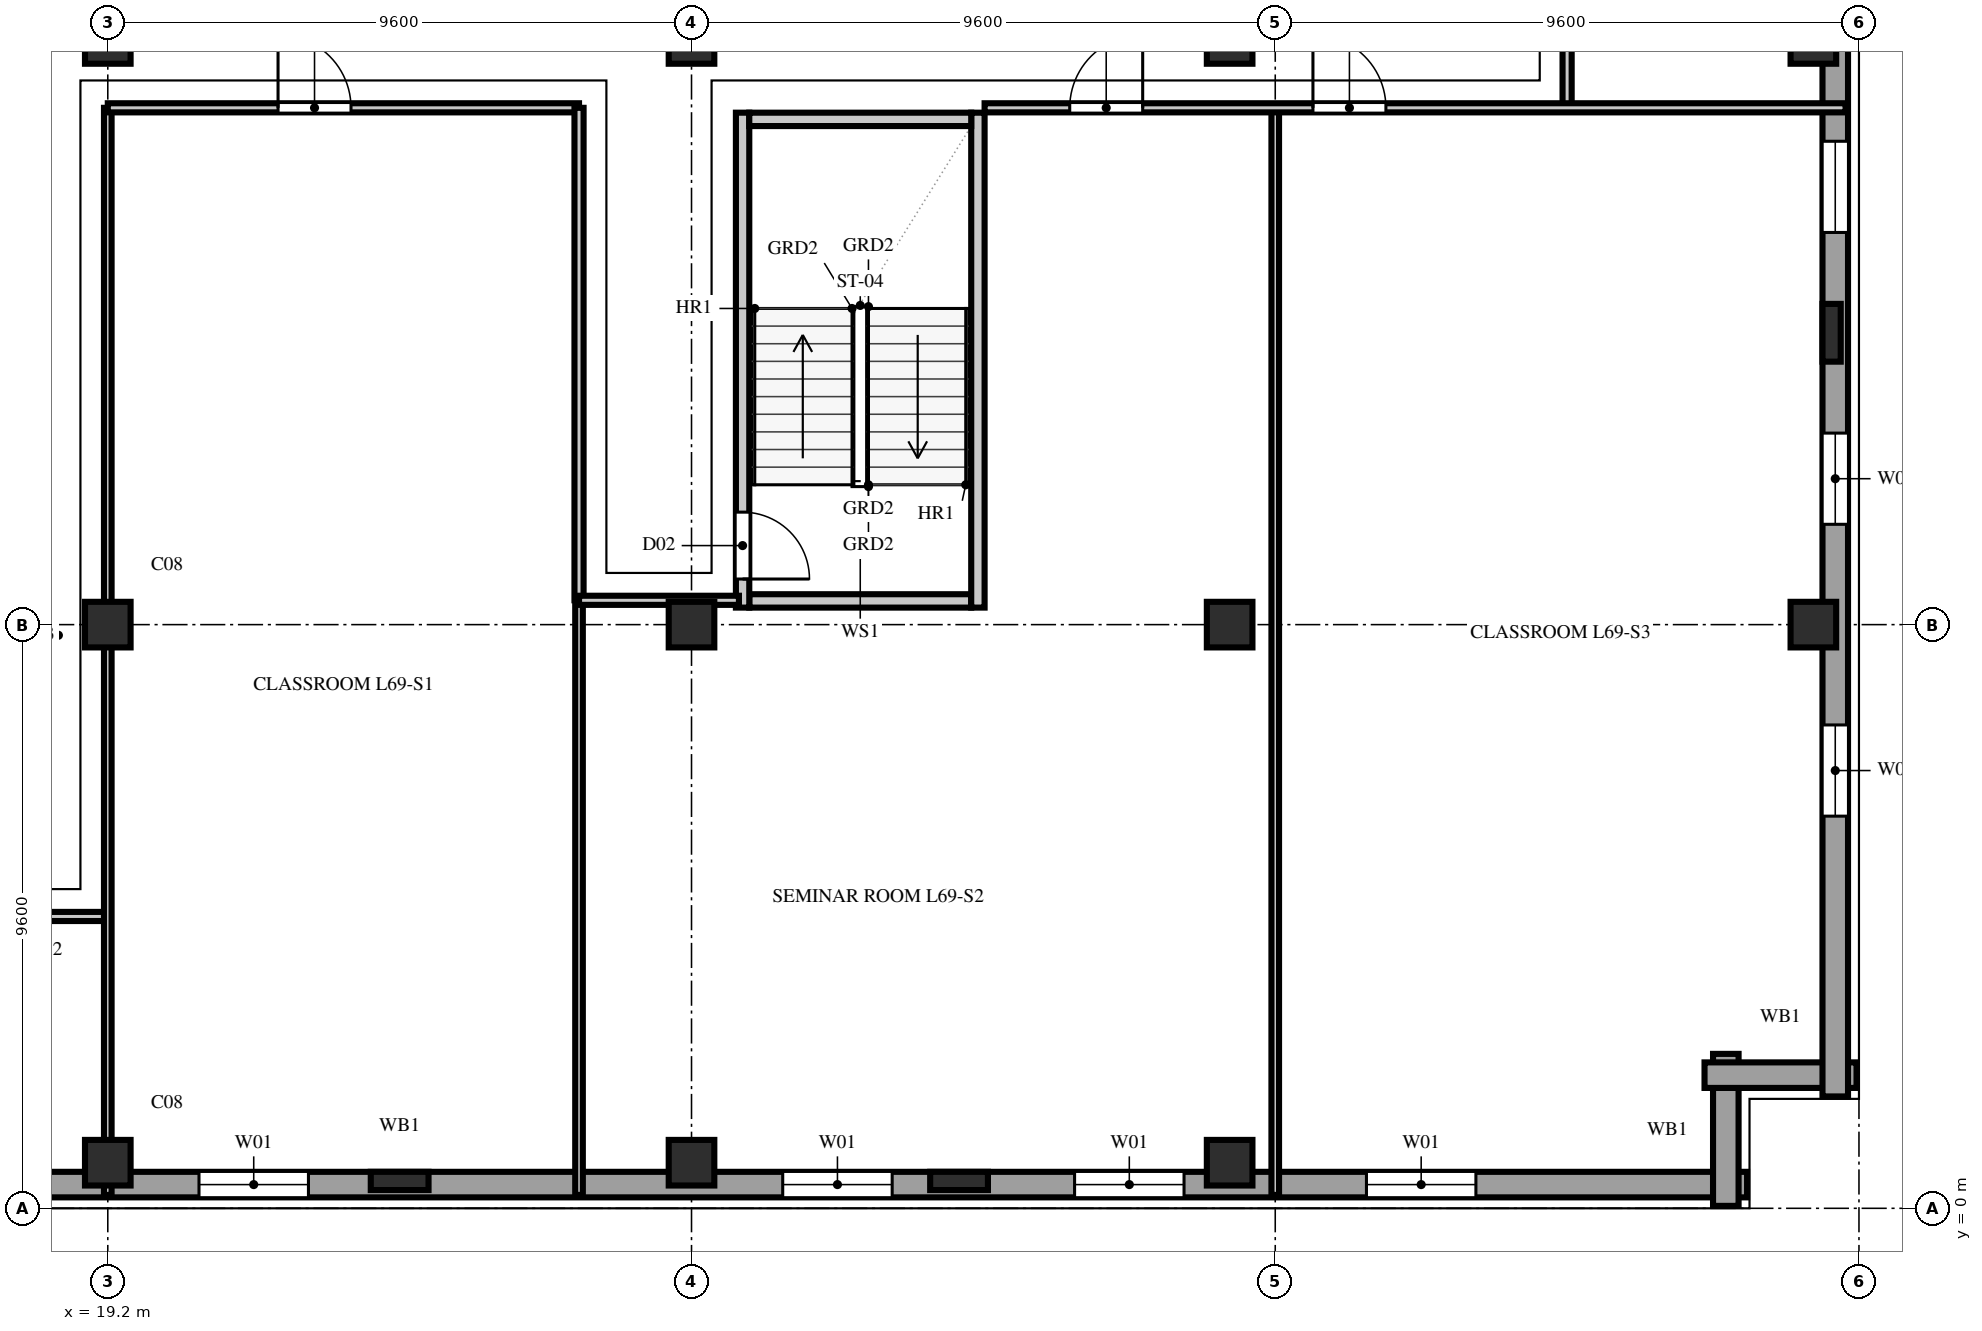
"""IFC4 building model, lengths in metres.
Left out: names, types, materials, properties, quantities, classifications, styles, units other than length and angle.
Written with IfcOpenShell. Run it as: python <this file> out.ifc"""

import sys

from ifc_helpers import new_model, si_unit, direction, frame, frame_2d, origin, origin_2d, place, context, subcontext, project, spatial, rectangle, extrude, element, fill, save


model = new_model("IFC4")
c1 = context("Model", 3, precision=1e-05, world=origin(), true_north=direction((0.0, 1.0)))
c2 = subcontext(c1, "Body", "Model", "MODEL_VIEW")
j1 = project(units=[si_unit("LENGTHUNIT", "METRE"), si_unit("PLANEANGLEUNIT", "RADIAN")], contexts=[c1])
p1 = place(None, origin())
s1 = spatial("IfcSite", under=j1, at=p1, CompositionType="ELEMENT")
p2 = place(p1, origin())
s2 = spatial("IfcBuilding", under=s1, at=p2, CompositionType="ELEMENT")
p3 = place(p2, frame((0.0, 0.0, 273.4)))
s3 = spatial("IfcBuildingStorey", under=s2, at=p3, CompositionType="ELEMENT", Elevation=273.4)
for number, where, z_axis, x_axis in (
    (1, (19.2, 0.75, 0.0), (0.0, 0.0, 1.0), (1.0, 0.0, 0.0)),
    (2, (19.2, 9.6, 0.0), (0.0, 0.0, 1.0), (1.0, 0.0, 0.0)),
    (3, (19.2, 19.2, 0.0), (0.0, 0.0, 1.0), (1.0, 0.0, 0.0)),
    (4, (28.8, 0.75, 0.0), (0.0, 0.0, 1.0), (1.0, 0.0, 0.0)),
    (5, (28.8, 9.6, 0.0), (0.0, 0.0, 1.0), (1.0, 0.0, 0.0)),
    (6, (28.8, 19.2, 0.0), (0.0, 0.0, 1.0), (1.0, 0.0, 0.0)),
    (7, (37.65, 0.75, 0.0), (0.0, 0.0, 1.0), (1.0, 0.0, 0.0)),
    (8, (37.65, 9.6, 0.0), (0.0, 0.0, 1.0), (1.0, 0.0, 0.0)),
    (9, (37.65, 19.2, 0.0), (0.0, 0.0, 1.0), (1.0, 0.0, 0.0)),
    (10, (47.25, 9.6, 0.0), (0.0, 0.0, 1.0), (1.0, 0.0, 0.0)),
    (11, (47.25, 19.2, 0.0), (0.0, 0.0, 1.0), (1.0, 0.0, 0.0)),
):
    element("IfcColumn", number, at=place(p3, frame(where, z_axis=z_axis, x_axis=x_axis)), inside=s3, PredefinedType="COLUMN", context=c2, shape_type="SweptSolid", body=[
        extrude(rectangle(XDim=0.75, YDim=0.75, at=origin_2d()), origin(), (0.0, 0.0, 1.0), 3.8),
    ])
for number, where, z_axis, x_axis in (
    (12, (24.0, 0.45, 0.0), (0.0, 0.0, 1.0), (1.0, 0.0, 0.0)),
    (13, (33.2, 0.45, 0.0), (0.0, 0.0, 1.0), (1.0, 0.0, 0.0)),
    (14, (47.55, 14.4, 0.0), (0.0, 0.0, 1.0), (0.0, 1.0, 0.0)),
):
    element("IfcColumn", number, at=place(p3, frame(where, z_axis=z_axis, x_axis=x_axis)), inside=s3, PredefinedType="PILASTER", context=c2, shape_type="SweptSolid", body=[
        extrude(rectangle(XDim=0.95, YDim=0.3, at=origin_2d()), origin(), (0.0, 0.0, 1.0), 3.8),
    ])
p4 = place(p3, frame((1.84, 0.39, 0.0), z_axis=(0.0, 0.0, 1.0), x_axis=(1.0, 0.0, 0.0)))
e15 = element("IfcWall", 15, at=p4, inside=s3, PredefinedType="SOLIDWALL", context=c2, shape_type="SweptSolid", body=[
    extrude(rectangle(XDim=44.32, YDim=0.42, at=frame_2d((22.16, 0.0))), origin(), (0.0, 0.0, 1.0), 3.54),
])
p5 = place(p4, frame((4.46, 0.0, 0.85)))
e16 = element("IfcOpeningElement", 16, at=p5, cuts=e15, PredefinedType="OPENING", context=c2, shape_type="SweptSolid", body=[
    extrude(rectangle(XDim=1.8, YDim=1.85, at=frame_2d((0.9, 0.925))), frame((0.0, 0.222, 0.0), z_axis=(0.0, -1.0, 0.0), x_axis=(1.0, 0.0, 0.0)), (0.0, 0.0, 1.0), 0.444),
])
p6 = place(p4, frame((9.26, 0.0, 0.85)))
e17 = element("IfcOpeningElement", 17, at=p6, cuts=e15, PredefinedType="OPENING", context=c2, shape_type="SweptSolid", body=[
    extrude(rectangle(XDim=1.8, YDim=1.85, at=frame_2d((0.9, 0.925))), frame((0.0, 0.222, 0.0), z_axis=(0.0, -1.0, 0.0), x_axis=(1.0, 0.0, 0.0)), (0.0, 0.0, 1.0), 0.444),
])
p7 = place(p4, frame((18.86, 0.0, 0.85)))
e18 = element("IfcOpeningElement", 18, at=p7, cuts=e15, PredefinedType="OPENING", context=c2, shape_type="SweptSolid", body=[
    extrude(rectangle(XDim=1.8, YDim=1.85, at=frame_2d((0.9, 0.925))), frame((0.0, 0.222, 0.0), z_axis=(0.0, -1.0, 0.0), x_axis=(1.0, 0.0, 0.0)), (0.0, 0.0, 1.0), 0.444),
])
p8 = place(p4, frame((28.46, 0.0, 0.85)))
e19 = element("IfcOpeningElement", 19, at=p8, cuts=e15, PredefinedType="OPENING", context=c2, shape_type="SweptSolid", body=[
    extrude(rectangle(XDim=1.8, YDim=1.85, at=frame_2d((0.9, 0.925))), frame((0.0, 0.222, 0.0), z_axis=(0.0, -1.0, 0.0), x_axis=(1.0, 0.0, 0.0)), (0.0, 0.0, 1.0), 0.444),
])
p9 = place(p4, frame((33.26, 0.0, 0.85)))
e20 = element("IfcOpeningElement", 20, at=p9, cuts=e15, PredefinedType="OPENING", context=c2, shape_type="SweptSolid", body=[
    extrude(rectangle(XDim=1.8, YDim=1.85, at=frame_2d((0.9, 0.925))), frame((0.0, 0.222, 0.0), z_axis=(0.0, -1.0, 0.0), x_axis=(1.0, 0.0, 0.0)), (0.0, 0.0, 1.0), 0.444),
])
p10 = place(p4, frame((38.06, 0.0, 0.85)))
e21 = element("IfcOpeningElement", 21, at=p10, cuts=e15, PredefinedType="OPENING", context=c2, shape_type="SweptSolid", body=[
    extrude(rectangle(XDim=1.8, YDim=1.85, at=frame_2d((0.9, 0.925))), frame((0.0, 0.222, 0.0), z_axis=(0.0, -1.0, 0.0), x_axis=(1.0, 0.0, 0.0)), (0.0, 0.0, 1.0), 0.444),
])
for number, where, z_axis, x_axis in (
    (22, (45.81, 0.04, 0.0), (0.0, 0.0, 1.0), (0.0, 1.0, 0.0)),
    (23, (45.46, 2.19, 0.0), (0.0, 0.0, 1.0), (1.0, 0.0, 0.0)),
):
    element("IfcWall", number, at=place(p3, frame(where, z_axis=z_axis, x_axis=x_axis)), inside=s3, PredefinedType="SOLIDWALL", context=c2, shape_type="SweptSolid", body=[
        extrude(rectangle(XDim=2.5, YDim=0.42, at=frame_2d((1.25, 0.0))), origin(), (0.0, 0.0, 1.0), 3.54),
    ])
p11 = place(p3, frame((47.61, 1.84, 0.0), z_axis=(0.0, 0.0, 1.0), x_axis=(0.0, 1.0, 0.0)))
e24 = element("IfcWall", 24, at=p11, inside=s3, PredefinedType="SOLIDWALL", context=c2, shape_type="SweptSolid", body=[
    extrude(rectangle(XDim=34.72, YDim=0.42, at=frame_2d((17.36, 0.0))), origin(), (0.0, 0.0, 1.0), 3.54),
])
p12 = place(p11, frame((4.61, 0.0, 0.85)))
e25 = element("IfcOpeningElement", 25, at=p12, cuts=e24, PredefinedType="OPENING", context=c2, shape_type="SweptSolid", body=[
    extrude(rectangle(XDim=1.5, YDim=1.85, at=frame_2d((0.75, 0.925))), frame((0.0, 0.222, 0.0), z_axis=(0.0, -1.0, 0.0), x_axis=(1.0, 0.0, 0.0)), (0.0, 0.0, 1.0), 0.444),
])
p13 = place(p11, frame((9.41, 0.0, 0.85)))
e26 = element("IfcOpeningElement", 26, at=p13, cuts=e24, PredefinedType="OPENING", context=c2, shape_type="SweptSolid", body=[
    extrude(rectangle(XDim=1.5, YDim=1.85, at=frame_2d((0.75, 0.925))), frame((0.0, 0.222, 0.0), z_axis=(0.0, -1.0, 0.0), x_axis=(1.0, 0.0, 0.0)), (0.0, 0.0, 1.0), 0.444),
])
p14 = place(p11, frame((14.21, 0.0, 0.85)))
e27 = element("IfcOpeningElement", 27, at=p14, cuts=e24, PredefinedType="OPENING", context=c2, shape_type="SweptSolid", body=[
    extrude(rectangle(XDim=1.5, YDim=1.85, at=frame_2d((0.75, 0.925))), frame((0.0, 0.222, 0.0), z_axis=(0.0, -1.0, 0.0), x_axis=(1.0, 0.0, 0.0)), (0.0, 0.0, 1.0), 0.444),
])
p15 = place(p11, frame((23.81, 0.0, 0.85)))
e28 = element("IfcOpeningElement", 28, at=p15, cuts=e24, PredefinedType="OPENING", context=c2, shape_type="SweptSolid", body=[
    extrude(rectangle(XDim=1.5, YDim=1.85, at=frame_2d((0.75, 0.925))), frame((0.0, 0.222, 0.0), z_axis=(0.0, -1.0, 0.0), x_axis=(1.0, 0.0, 0.0)), (0.0, 0.0, 1.0), 0.444),
])
p16 = place(p11, frame((28.61, 0.0, 0.85)))
e29 = element("IfcOpeningElement", 29, at=p16, cuts=e24, PredefinedType="OPENING", context=c2, shape_type="SweptSolid", body=[
    extrude(rectangle(XDim=1.5, YDim=1.85, at=frame_2d((0.75, 0.925))), frame((0.0, 0.222, 0.0), z_axis=(0.0, -1.0, 0.0), x_axis=(1.0, 0.0, 0.0)), (0.0, 0.0, 1.0), 0.444),
])
p17 = place(p3, frame((29.75, 9.99, 0.0), z_axis=(0.0, 0.0, 1.0), x_axis=(1.0, 0.0, 0.0)))
e30 = element("IfcWall", 30, at=p17, inside=s3, PredefinedType="SOLIDWALL", context=c2, shape_type="SweptSolid", body=[
    extrude(rectangle(XDim=3.65, YDim=0.22, at=frame_2d((1.825, 0.0))), origin(), (0.0, 0.0, 1.0), 3.54),
])
p18 = place(p3, frame((29.64, 9.88, 0.0), z_axis=(0.0, 0.0, 1.0), x_axis=(0.0, 1.0, 0.0)))
e31 = element("IfcWall", 31, at=p18, inside=s3, PredefinedType="SOLIDWALL", context=c2, shape_type="SweptSolid", body=[
    extrude(rectangle(XDim=8.14, YDim=0.22, at=frame_2d((4.07, 0.0))), origin(), (0.0, 0.0, 1.0), 3.54),
])
p19 = place(p18, frame((0.47, 0.0, 0.0)))
e32 = element("IfcOpeningElement", 32, at=p19, cuts=e31, PredefinedType="OPENING", context=c2, shape_type="SweptSolid", body=[
    extrude(rectangle(XDim=1.1, YDim=2.2, at=frame_2d((0.55, 1.1))), frame((0.0, 0.122, 0.0), z_axis=(0.0, -1.0, 0.0), x_axis=(1.0, 0.0, 0.0)), (0.0, 0.0, 1.0), 0.244),
])
p20 = place(p3, frame((33.51, 9.88, 0.0), z_axis=(0.0, 0.0, 1.0), x_axis=(0.0, 1.0, 0.0)))
e33 = element("IfcWall", 33, at=p20, inside=s3, PredefinedType="SOLIDWALL", context=c2, shape_type="SweptSolid", body=[
    extrude(rectangle(XDim=8.14, YDim=0.22, at=frame_2d((4.07, 0.0))), origin(), (0.0, 0.0, 1.0), 3.54),
])
p21 = place(p3, frame((29.75, 17.91, 0.0), z_axis=(0.0, 0.0, 1.0), x_axis=(1.0, 0.0, 0.0)))
e34 = element("IfcWall", 34, at=p21, inside=s3, PredefinedType="SOLIDWALL", context=c2, shape_type="SweptSolid", body=[
    extrude(rectangle(XDim=3.65, YDim=0.22, at=frame_2d((1.825, 0.0))), origin(), (0.0, 0.0, 1.0), 3.54),
])
p22 = place(p3, frame((17.05, 4.8, 0.0), z_axis=(0.0, 0.0, 1.0), x_axis=(1.0, 0.0, 0.0)))
e35 = element("IfcWall", 35, at=p22, inside=s3, PredefinedType="PARTITIONING", context=c2, shape_type="SweptSolid", body=[
    extrude(rectangle(XDim=2.15, YDim=0.15, at=frame_2d((1.075, 0.0))), origin(), (0.0, 0.0, 1.0), 3.54),
])
p23 = place(p3, frame((43.2, 18.1, 0.0), z_axis=(0.0, 0.0, 1.0), x_axis=(0.0, 1.0, 0.0)))
e36 = element("IfcWall", 36, at=p23, inside=s3, PredefinedType="PARTITIONING", context=c2, shape_type="SweptSolid", body=[
    extrude(rectangle(XDim=2.85, YDim=0.15, at=frame_2d((1.425, 0.0))), origin(), (0.0, 0.0, 1.0), 3.54),
])
p24 = place(p3, frame((19.2, 0.22, 0.0), z_axis=(0.0, 0.0, 1.0), x_axis=(0.0, 1.0, 0.0)))
e37 = element("IfcWall", 37, at=p24, inside=s3, PredefinedType="PARTITIONING", context=c2, shape_type="SweptSolid", body=[
    extrude(rectangle(XDim=0.53, YDim=0.125, at=frame_2d((0.265, 0.0))), origin(), (0.0, 0.0, 1.0), 3.54),
])
p25 = place(p3, frame((19.2, 0.75, 0.0), z_axis=(0.0, 0.0, 1.0), x_axis=(0.0, 1.0, 0.0)))
e38 = element("IfcWall", 38, at=p25, inside=s3, PredefinedType="PARTITIONING", context=c2, shape_type="SweptSolid", body=[
    extrude(rectangle(XDim=17.35, YDim=0.125, at=frame_2d((8.675, 0.0))), origin(), (0.0, 0.0, 1.0), 3.123),
])
p26 = place(p3, frame((19.2, 18.1, 0.0), z_axis=(0.0, 0.0, 1.0), x_axis=(1.0, 0.0, 0.0)))
e39 = element("IfcWall", 39, at=p26, inside=s3, PredefinedType="PARTITIONING", context=c2, shape_type="SweptSolid", body=[
    extrude(rectangle(XDim=7.75, YDim=0.15, at=frame_2d((3.875, 0.0))), origin(), (0.0, 0.0, 1.0), 3.54),
])
p27 = place(p26, frame((2.8, 0.0, 0.0)))
e40 = element("IfcOpeningElement", 40, at=p27, cuts=e39, PredefinedType="OPENING", context=c2, shape_type="SweptSolid", body=[
    extrude(rectangle(XDim=1.2, YDim=2.2, at=frame_2d((0.6, 1.1))), frame((0.0, 0.087, 0.0), z_axis=(0.0, -1.0, 0.0), x_axis=(1.0, 0.0, 0.0)), (0.0, 0.0, 1.0), 0.174),
])
p28 = place(p3, frame((26.95, 0.22, 0.0), z_axis=(0.0, 0.0, 1.0), x_axis=(0.0, 1.0, 0.0)))
e41 = element("IfcWall", 41, at=p28, inside=s3, PredefinedType="PARTITIONING", context=c2, shape_type="SweptSolid", body=[
    extrude(rectangle(XDim=9.78, YDim=0.125, at=frame_2d((4.89, 0.0))), origin(), (0.0, 0.0, 1.0), 3.54),
])
p29 = place(p3, frame((26.95, 10.0, 0.0), z_axis=(0.0, 0.0, 1.0), x_axis=(0.0, 1.0, 0.0)))
e42 = element("IfcWall", 42, at=p29, inside=s3, PredefinedType="PARTITIONING", context=c2, shape_type="SweptSolid", body=[
    extrude(rectangle(XDim=8.1, YDim=0.15, at=frame_2d((4.05, 0.0))), origin(), (0.0, 0.0, 1.0), 3.54),
])
p30 = place(p3, frame((26.95, 10.0, 0.0), z_axis=(0.0, 0.0, 1.0), x_axis=(1.0, 0.0, 0.0)))
e43 = element("IfcWall", 43, at=p30, inside=s3, PredefinedType="PARTITIONING", context=c2, shape_type="SweptSolid", body=[
    extrude(rectangle(XDim=2.63, YDim=0.15, at=frame_2d((1.315, 0.0))), origin(), (0.0, 0.0, 1.0), 3.54),
])
p31 = place(p3, frame((38.4, 0.22, 0.0), z_axis=(0.0, 0.0, 1.0), x_axis=(0.0, 1.0, 0.0)))
e44 = element("IfcWall", 44, at=p31, inside=s3, PredefinedType="PARTITIONING", context=c2, shape_type="SweptSolid", body=[
    extrude(rectangle(XDim=17.88, YDim=0.125, at=frame_2d((8.94, 0.0))), origin(), (0.0, 0.0, 1.0), 3.54),
])
p32 = place(p3, frame((33.62, 18.1, 0.0), z_axis=(0.0, 0.0, 1.0), x_axis=(1.0, 0.0, 0.0)))
e45 = element("IfcWall", 45, at=p32, inside=s3, PredefinedType="PARTITIONING", context=c2, shape_type="SweptSolid", body=[
    extrude(rectangle(XDim=14.16, YDim=0.15, at=frame_2d((7.08, 0.0))), origin(), (0.0, 0.0, 1.0), 3.54),
])
p33 = place(p32, frame((1.4, 0.0, 0.0)))
e46 = element("IfcOpeningElement", 46, at=p33, cuts=e45, PredefinedType="OPENING", context=c2, shape_type="SweptSolid", body=[
    extrude(rectangle(XDim=1.2, YDim=2.2, at=frame_2d((0.6, 1.1))), frame((0.0, 0.087, 0.0), z_axis=(0.0, -1.0, 0.0), x_axis=(1.0, 0.0, 0.0)), (0.0, 0.0, 1.0), 0.174),
])
p34 = place(p32, frame((5.4, 0.0, 0.0)))
e47 = element("IfcOpeningElement", 47, at=p34, cuts=e45, PredefinedType="OPENING", context=c2, shape_type="SweptSolid", body=[
    extrude(rectangle(XDim=1.2, YDim=2.2, at=frame_2d((0.6, 1.1))), frame((0.0, 0.087, 0.0), z_axis=(0.0, -1.0, 0.0), x_axis=(1.0, 0.0, 0.0)), (0.0, 0.0, 1.0), 0.174),
])
p35 = place(p7, origin())
e48 = element("IfcWindow", 48, at=p35, inside=s3, PartitioningType="DOUBLE_PANEL_VERTICAL", PredefinedType="WINDOW", context=c2, shape_type="SweptSolid", body=[
    extrude(rectangle(XDim=1.8, YDim=1.85, at=frame_2d((0.9, 0.925))), frame((0.0, 0.11, 0.0), z_axis=(0.0, -1.0, 0.0), x_axis=(1.0, 0.0, 0.0)), (0.0, 0.0, 1.0), 0.06),
])
fill(e18, e48)
p36 = place(p8, origin())
e49 = element("IfcWindow", 49, at=p36, inside=s3, PartitioningType="DOUBLE_PANEL_VERTICAL", PredefinedType="WINDOW", context=c2, shape_type="SweptSolid", body=[
    extrude(rectangle(XDim=1.8, YDim=1.85, at=frame_2d((0.9, 0.925))), frame((0.0, 0.11, 0.0), z_axis=(0.0, -1.0, 0.0), x_axis=(1.0, 0.0, 0.0)), (0.0, 0.0, 1.0), 0.06),
])
fill(e19, e49)
p37 = place(p9, origin())
e50 = element("IfcWindow", 50, at=p37, inside=s3, PartitioningType="DOUBLE_PANEL_VERTICAL", PredefinedType="WINDOW", context=c2, shape_type="SweptSolid", body=[
    extrude(rectangle(XDim=1.8, YDim=1.85, at=frame_2d((0.9, 0.925))), frame((0.0, 0.11, 0.0), z_axis=(0.0, -1.0, 0.0), x_axis=(1.0, 0.0, 0.0)), (0.0, 0.0, 1.0), 0.06),
])
fill(e20, e50)
p38 = place(p10, origin())
e51 = element("IfcWindow", 51, at=p38, inside=s3, PartitioningType="DOUBLE_PANEL_VERTICAL", PredefinedType="WINDOW", context=c2, shape_type="SweptSolid", body=[
    extrude(rectangle(XDim=1.8, YDim=1.85, at=frame_2d((0.9, 0.925))), frame((0.0, 0.11, 0.0), z_axis=(0.0, -1.0, 0.0), x_axis=(1.0, 0.0, 0.0)), (0.0, 0.0, 1.0), 0.06),
])
fill(e21, e51)
p39 = place(p12, origin())
e52 = element("IfcWindow", 52, at=p39, inside=s3, PartitioningType="DOUBLE_PANEL_VERTICAL", PredefinedType="WINDOW", context=c2, shape_type="SweptSolid", body=[
    extrude(rectangle(XDim=1.5, YDim=1.85, at=frame_2d((0.75, 0.925))), frame((0.0, 0.11, 0.0), z_axis=(0.0, -1.0, 0.0), x_axis=(1.0, 0.0, 0.0)), (0.0, 0.0, 1.0), 0.06),
])
fill(e25, e52)
p40 = place(p13, origin())
e53 = element("IfcWindow", 53, at=p40, inside=s3, PartitioningType="DOUBLE_PANEL_VERTICAL", PredefinedType="WINDOW", context=c2, shape_type="SweptSolid", body=[
    extrude(rectangle(XDim=1.5, YDim=1.85, at=frame_2d((0.75, 0.925))), frame((0.0, 0.11, 0.0), z_axis=(0.0, -1.0, 0.0), x_axis=(1.0, 0.0, 0.0)), (0.0, 0.0, 1.0), 0.06),
])
fill(e26, e53)
p41 = place(p14, origin())
e54 = element("IfcWindow", 54, at=p41, inside=s3, PartitioningType="DOUBLE_PANEL_VERTICAL", PredefinedType="WINDOW", context=c2, shape_type="SweptSolid", body=[
    extrude(rectangle(XDim=1.5, YDim=1.85, at=frame_2d((0.75, 0.925))), frame((0.0, 0.11, 0.0), z_axis=(0.0, -1.0, 0.0), x_axis=(1.0, 0.0, 0.0)), (0.0, 0.0, 1.0), 0.06),
])
fill(e27, e54)
p42 = place(p19, frame((1.1, 0.0, 0.0), z_axis=(0.0, 0.0, 1.0), x_axis=(-1.0, 0.0, 0.0)))
e55 = element("IfcDoor", 55, at=p42, inside=s3, OperationType="SINGLE_SWING_RIGHT", PredefinedType="DOOR", context=c2, shape_type="SweptSolid", body=[
    extrude(rectangle(XDim=1.1, YDim=2.2, at=frame_2d((0.55, 1.1))), frame((0.0, 0.025, 0.0), z_axis=(0.0, -1.0, 0.0), x_axis=(1.0, 0.0, 0.0)), (0.0, 0.0, 1.0), 0.05),
])
fill(e32, e55)
p43 = place(p27, origin())
e56 = element("IfcDoor", 56, at=p43, inside=s3, OperationType="SINGLE_SWING_LEFT", PredefinedType="DOOR", context=c2, shape_type="SweptSolid", body=[
    extrude(rectangle(XDim=1.2, YDim=2.2, at=frame_2d((0.6, 1.1))), frame((0.0, 0.025, 0.0), z_axis=(0.0, -1.0, 0.0), x_axis=(1.0, 0.0, 0.0)), (0.0, 0.0, 1.0), 0.05),
])
fill(e40, e56)
p44 = place(p33, origin())
e57 = element("IfcDoor", 57, at=p44, inside=s3, OperationType="SINGLE_SWING_RIGHT", PredefinedType="DOOR", context=c2, shape_type="SweptSolid", body=[
    extrude(rectangle(XDim=1.2, YDim=2.2, at=frame_2d((0.6, 1.1))), frame((0.0, 0.025, 0.0), z_axis=(0.0, -1.0, 0.0), x_axis=(1.0, 0.0, 0.0)), (0.0, 0.0, 1.0), 0.05),
])
fill(e46, e57)
p45 = place(p34, origin())
e58 = element("IfcDoor", 58, at=p45, inside=s3, OperationType="SINGLE_SWING_LEFT", PredefinedType="DOOR", context=c2, shape_type="SweptSolid", body=[
    extrude(rectangle(XDim=1.2, YDim=2.2, at=frame_2d((0.6, 1.1))), frame((0.0, 0.025, 0.0), z_axis=(0.0, -1.0, 0.0), x_axis=(1.0, 0.0, 0.0)), (0.0, 0.0, 1.0), 0.05),
])
fill(e47, e58)
save(model, sys.argv[1])
